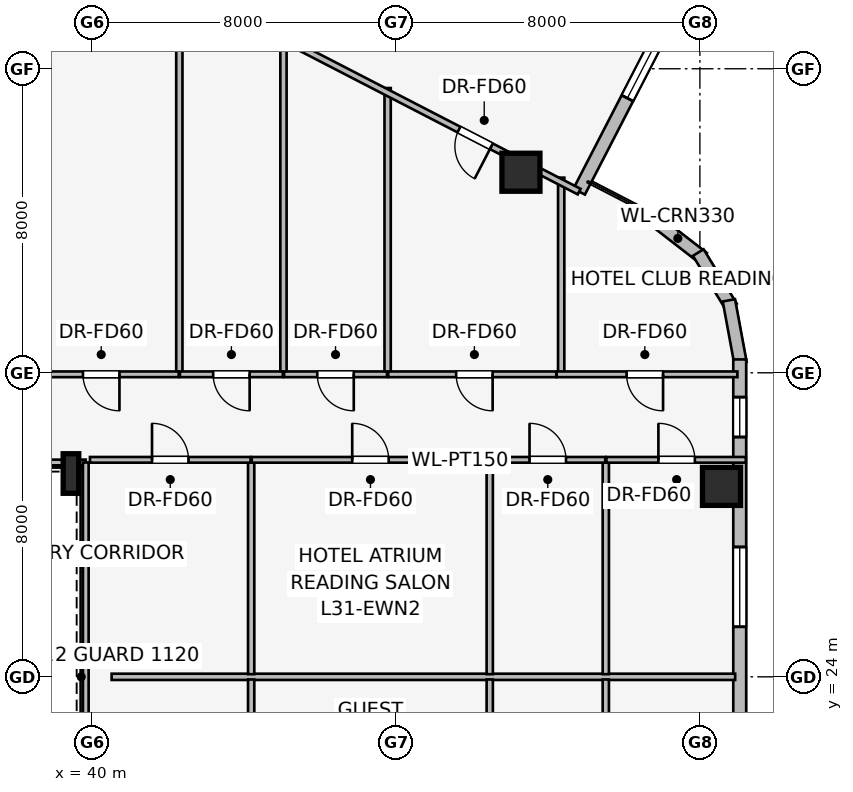
"""IFC4 building model, lengths in metres.
Left out: names, types, materials, properties, quantities, classifications, styles, units other than length and angle.
Written with IfcOpenShell. Run it as: python <this file> out.ifc"""

import sys

from ifc_helpers import new_model, si_unit, direction, frame, frame_2d, origin, origin_2d, place, context, subcontext, project, spatial, rectangle, i_section, extrude, element, fill, save


model = new_model("IFC4")
c1 = context("Model", 3, precision=1e-05, world=origin(), true_north=direction((0.0, 1.0)))
c2 = subcontext(c1, "Body", "Model", "MODEL_VIEW")
j1 = project(units=[si_unit("LENGTHUNIT", "METRE"), si_unit("PLANEANGLEUNIT", "RADIAN")], contexts=[c1])
p1 = place(None, origin())
s1 = spatial("IfcSite", under=j1, at=p1, CompositionType="ELEMENT")
p2 = place(p1, origin())
s2 = spatial("IfcBuilding", under=s1, at=p2, CompositionType="ELEMENT")
p3 = place(p2, frame((0.0, 0.0, 118.8)))
s3 = spatial("IfcBuildingStorey", under=s2, at=p3, CompositionType="ELEMENT", Elevation=118.8)
for number, where, z_axis, x_axis in (
    (1, (51.291, 37.277, 0.0), (0.0, 0.0, 1.0), (1.0, 0.0, 0.0)),
    (2, (56.568, 29.011, 0.0), (0.0, 0.0, 1.0), (1.0, 0.0, 0.0)),
):
    element("IfcColumn", number, at=place(p3, frame(where, z_axis=z_axis, x_axis=x_axis)), inside=s3, PredefinedType="COLUMN", context=c2, shape_type="SweptSolid", body=[
        extrude(rectangle(XDim=1.0, YDim=1.0, at=origin_2d()), origin(), (0.0, 0.0, 1.0), 3.45),
    ])
p4 = place(p3, frame((39.45, 29.35, 0.0), z_axis=(0.0, 0.0, 1.0), x_axis=(1.0, 0.0, 0.0)))
e3 = element("IfcColumn", 3, at=p4, inside=s3, PredefinedType="COLUMN", context=c2, shape_type="SweptSolid", body=[
    extrude(i_section(OverallWidth=0.41, OverallDepth=1.041, WebThickness=0.031, FlangeThickness=0.056, at=origin_2d()), origin(), (0.0, 0.0, 1.0), 3.45),
])
p5 = place(p3, frame((54.757, 36.05, 0.0), z_axis=(0.0, 0.0, 1.0), x_axis=(0.790621329885, -0.612305408053, 0.0)))
e4 = element("IfcWall", 4, at=p5, inside=s3, PredefinedType="STANDARD", context=c2, shape_type="SweptSolid", body=[
    extrude(rectangle(XDim=1.676, YDim=0.33, at=frame_2d((0.838, 0.0))), origin(), (0.0, 0.0, 1.0), 3.19),
])
p6 = place(p3, frame((55.957, 35.164, 0.0), z_axis=(0.0, 0.0, 1.0), x_axis=(0.520519429557, -0.853849824883, 0.0)))
e5 = element("IfcWall", 5, at=p6, inside=s3, PredefinedType="STANDARD", context=c2, shape_type="SweptSolid", body=[
    extrude(rectangle(XDim=1.677, YDim=0.33, at=frame_2d((0.839, 0.0))), origin(), (0.0, 0.0, 1.0), 3.19),
])
p7 = place(p3, frame((56.763, 33.907, 0.0), z_axis=(0.0, 0.0, 1.0), x_axis=(0.181984991895, -0.983301308209, 0.0)))
e6 = element("IfcWall", 6, at=p7, inside=s3, PredefinedType="STANDARD", context=c2, shape_type="SweptSolid", body=[
    extrude(rectangle(XDim=1.677, YDim=0.33, at=frame_2d((0.838, 0.0))), origin(), (0.0, 0.0, 1.0), 3.19),
])
p8 = place(p3, frame((61.63, 53.828, 0.0), z_axis=(0.0, 0.0, 1.0), x_axis=(-0.458697010696, -0.888592737073, 0.0)))
e7 = element("IfcWall", 7, at=p8, inside=s3, PredefinedType="STANDARD", context=c2, shape_type="SweptSolid", body=[
    extrude(rectangle(XDim=19.2, YDim=0.34, at=frame_2d((9.6, 0.0))), origin(), (0.0, 0.0, 1.0), 3.19),
])
p9 = place(p8, frame((2.767, 0.0, 0.75)))
e8 = element("IfcOpeningElement", 8, at=p9, cuts=e7, PredefinedType="OPENING", context=c2, shape_type="SweptSolid", body=[
    extrude(rectangle(XDim=1.6, YDim=1.55, at=frame_2d((0.8, 0.775))), frame((0.0, 0.18, 0.0), z_axis=(0.0, -1.0, 0.0), x_axis=(1.0, 0.0, 0.0)), (0.0, 0.0, 1.0), 0.36),
])
p10 = place(p8, frame((8.8, 0.0, 0.75)))
e9 = element("IfcOpeningElement", 9, at=p10, cuts=e7, PredefinedType="OPENING", context=c2, shape_type="SweptSolid", body=[
    extrude(rectangle(XDim=1.6, YDim=1.55, at=frame_2d((0.8, 0.775))), frame((0.0, 0.18, 0.0), z_axis=(0.0, -1.0, 0.0), x_axis=(1.0, 0.0, 0.0)), (0.0, 0.0, 1.0), 0.36),
])
p11 = place(p8, frame((14.833, 0.0, 0.75)))
e10 = element("IfcOpeningElement", 10, at=p11, cuts=e7, PredefinedType="OPENING", context=c2, shape_type="SweptSolid", body=[
    extrude(rectangle(XDim=1.6, YDim=1.55, at=frame_2d((0.8, 0.775))), frame((0.0, 0.18, 0.0), z_axis=(0.0, -1.0, 0.0), x_axis=(1.0, 0.0, 0.0)), (0.0, 0.0, 1.0), 0.36),
])
p12 = place(p3, frame((57.048, 32.352, 0.0), z_axis=(0.0, 0.0, 1.0), x_axis=(0.0, -1.0, 0.0)))
e11 = element("IfcWall", 11, at=p12, inside=s3, PredefinedType="STANDARD", context=c2, shape_type="SweptSolid", body=[
    extrude(rectangle(XDim=16.704, YDim=0.34, at=frame_2d((8.352, 0.0))), origin(), (0.0, 0.0, 1.0), 3.19),
])
p13 = place(p12, frame((0.992, 0.0, 0.75)))
e12 = element("IfcOpeningElement", 12, at=p13, cuts=e11, PredefinedType="OPENING", context=c2, shape_type="SweptSolid", body=[
    extrude(rectangle(XDim=1.05, YDim=1.4, at=frame_2d((0.525, 0.7))), frame((0.0, 0.18, 0.0), z_axis=(0.0, -1.0, 0.0), x_axis=(1.0, 0.0, 0.0)), (0.0, 0.0, 1.0), 0.36),
])
p14 = place(p12, frame((4.935, 0.0, 0.75)))
e13 = element("IfcOpeningElement", 13, at=p14, cuts=e11, PredefinedType="OPENING", context=c2, shape_type="SweptSolid", body=[
    extrude(rectangle(XDim=2.1, YDim=1.5, at=frame_2d((1.05, 0.75))), frame((0.0, 0.18, 0.0), z_axis=(0.0, -1.0, 0.0), x_axis=(1.0, 0.0, 0.0)), (0.0, 0.0, 1.0), 0.36),
])
p15 = place(p12, frame((9.919, 0.0, 0.75)))
e14 = element("IfcOpeningElement", 14, at=p15, cuts=e11, PredefinedType="OPENING", context=c2, shape_type="SweptSolid", body=[
    extrude(rectangle(XDim=1.6, YDim=1.55, at=frame_2d((0.8, 0.775))), frame((0.0, 0.18, 0.0), z_axis=(0.0, -1.0, 0.0), x_axis=(1.0, 0.0, 0.0)), (0.0, 0.0, 1.0), 0.36),
])
p16 = place(p12, frame((14.702, 0.0, 0.75)))
e15 = element("IfcOpeningElement", 15, at=p16, cuts=e11, PredefinedType="OPENING", context=c2, shape_type="SweptSolid", body=[
    extrude(rectangle(XDim=1.05, YDim=1.4, at=frame_2d((0.525, 0.7))), frame((0.0, 0.18, 0.0), z_axis=(0.0, -1.0, 0.0), x_axis=(1.0, 0.0, 0.0)), (0.0, 0.0, 1.0), 0.36),
])
p17 = place(p3, frame((39.84, 29.64, 0.0), z_axis=(0.0, 0.0, 1.0), x_axis=(-1.0, 0.0, 0.0)))
e16 = element("IfcWall", 16, at=p17, inside=s3, PredefinedType="PARTITIONING", context=c2, shape_type="SweptSolid", body=[
    extrude(rectangle(XDim=12.2, YDim=0.15, at=frame_2d((6.1, 0.0))), origin(), (0.0, 0.0, 1.0), 2.331),
])
p18 = place(p3, frame((39.84, 18.36, 0.0), z_axis=(0.0, 0.0, 1.0), x_axis=(0.0, 1.0, 0.0)))
e17 = element("IfcWall", 17, at=p18, inside=s3, PredefinedType="PARTITIONING", context=c2, shape_type="SweptSolid", body=[
    extrude(rectangle(XDim=11.28, YDim=0.15, at=frame_2d((5.64, 0.0))), origin(), (0.0, 0.0, 1.0), 3.19),
])
p19 = place(p3, frame((42.302, 31.97, 0.0), z_axis=(0.0, 0.0, 1.0), x_axis=(0.0, 1.0, 0.0)))
e18 = element("IfcWall", 18, at=p19, inside=s3, PredefinedType="PARTITIONING", context=c2, shape_type="SweptSolid", body=[
    extrude(rectangle(XDim=10.352, YDim=0.165, at=frame_2d((5.176, 0.0))), origin(), (0.0, 0.0, 1.0), 3.19),
])
p20 = place(p3, frame((45.042, 31.97, 0.0), z_axis=(0.0, 0.0, 1.0), x_axis=(0.0, 1.0, 0.0)))
e19 = element("IfcWall", 19, at=p20, inside=s3, PredefinedType="PARTITIONING", context=c2, shape_type="SweptSolid", body=[
    extrude(rectangle(XDim=8.937, YDim=0.165, at=frame_2d((4.469, 0.0))), origin(), (0.0, 0.0, 1.0), 3.19),
])
p21 = place(p3, frame((47.783, 31.97, 0.0), z_axis=(0.0, 0.0, 1.0), x_axis=(0.0, 1.0, 0.0)))
e20 = element("IfcWall", 20, at=p21, inside=s3, PredefinedType="PARTITIONING", context=c2, shape_type="SweptSolid", body=[
    extrude(rectangle(XDim=7.523, YDim=0.165, at=frame_2d((3.761, 0.0))), origin(), (0.0, 0.0, 1.0), 3.19),
])
p22 = place(p3, frame((52.35, 31.97, 0.0), z_axis=(0.0, 0.0, 1.0), x_axis=(0.0, 1.0, 0.0)))
e21 = element("IfcWall", 21, at=p22, inside=s3, PredefinedType="PARTITIONING", context=c2, shape_type="SweptSolid", body=[
    extrude(rectangle(XDim=5.165, YDim=0.165, at=frame_2d((2.583, 0.0))), origin(), (0.0, 0.0, 1.0), 3.19),
])
p23 = place(p3, frame((42.286, 31.96, 0.0), z_axis=(0.0, 0.0, 1.0), x_axis=(-1.0, 0.0, 0.0)))
e22 = element("IfcWall", 22, at=p23, inside=s3, PredefinedType="PARTITIONING", context=c2, shape_type="SweptSolid", body=[
    extrude(rectangle(XDim=3.965, YDim=0.15, at=frame_2d((1.982, 0.0))), origin(), (0.0, 0.0, 1.0), 3.19),
])
p24 = place(p23, frame((1.56, 0.0, 0.0)))
e23 = element("IfcOpeningElement", 23, at=p24, cuts=e22, PredefinedType="OPENING", context=c2, shape_type="SweptSolid", body=[
    extrude(rectangle(XDim=0.96, YDim=2.0, at=frame_2d((0.48, 1.0))), frame((0.0, 0.085, 0.0), z_axis=(0.0, -1.0, 0.0), x_axis=(1.0, 0.0, 0.0)), (0.0, 0.0, 1.0), 0.17),
])
p25 = place(p3, frame((45.026, 31.96, 0.0), z_axis=(0.0, 0.0, 1.0), x_axis=(-1.0, 0.0, 0.0)))
e24 = element("IfcWall", 24, at=p25, inside=s3, PredefinedType="PARTITIONING", context=c2, shape_type="SweptSolid", body=[
    extrude(rectangle(XDim=2.708, YDim=0.15, at=frame_2d((1.354, 0.0))), origin(), (0.0, 0.0, 1.0), 3.19),
])
p26 = place(p25, frame((0.874, 0.0, 0.0)))
e25 = element("IfcOpeningElement", 25, at=p26, cuts=e24, PredefinedType="OPENING", context=c2, shape_type="SweptSolid", body=[
    extrude(rectangle(XDim=0.96, YDim=2.0, at=frame_2d((0.48, 1.0))), frame((0.0, 0.085, 0.0), z_axis=(0.0, -1.0, 0.0), x_axis=(1.0, 0.0, 0.0)), (0.0, 0.0, 1.0), 0.17),
])
p27 = place(p3, frame((47.767, 31.96, 0.0), z_axis=(0.0, 0.0, 1.0), x_axis=(-1.0, 0.0, 0.0)))
e26 = element("IfcWall", 26, at=p27, inside=s3, PredefinedType="PARTITIONING", context=c2, shape_type="SweptSolid", body=[
    extrude(rectangle(XDim=2.709, YDim=0.15, at=frame_2d((1.354, 0.0))), origin(), (0.0, 0.0, 1.0), 3.19),
])
p28 = place(p27, frame((0.875, 0.0, 0.0)))
e27 = element("IfcOpeningElement", 27, at=p28, cuts=e26, PredefinedType="OPENING", context=c2, shape_type="SweptSolid", body=[
    extrude(rectangle(XDim=0.96, YDim=2.0, at=frame_2d((0.48, 1.0))), frame((0.0, 0.085, 0.0), z_axis=(0.0, -1.0, 0.0), x_axis=(1.0, 0.0, 0.0)), (0.0, 0.0, 1.0), 0.17),
])
p29 = place(p3, frame((52.22, 31.96, 0.0), z_axis=(0.0, 0.0, 1.0), x_axis=(-1.0, 0.0, 0.0)))
e28 = element("IfcWall", 28, at=p29, inside=s3, PredefinedType="PARTITIONING", context=c2, shape_type="SweptSolid", body=[
    extrude(rectangle(XDim=4.421, YDim=0.15, at=frame_2d((2.21, 0.0))), origin(), (0.0, 0.0, 1.0), 3.19),
])
p30 = place(p29, frame((1.674, 0.0, 0.0)))
e29 = element("IfcOpeningElement", 29, at=p30, cuts=e28, PredefinedType="OPENING", context=c2, shape_type="SweptSolid", body=[
    extrude(rectangle(XDim=0.96, YDim=2.0, at=frame_2d((0.48, 1.0))), frame((0.0, 0.085, 0.0), z_axis=(0.0, -1.0, 0.0), x_axis=(1.0, 0.0, 0.0)), (0.0, 0.0, 1.0), 0.17),
])
p31 = place(p3, frame((56.987, 31.96, 0.0), z_axis=(0.0, 0.0, 1.0), x_axis=(-1.0, 0.0, 0.0)))
e30 = element("IfcWall", 30, at=p31, inside=s3, PredefinedType="PARTITIONING", context=c2, shape_type="SweptSolid", body=[
    extrude(rectangle(XDim=4.757, YDim=0.15, at=frame_2d((2.378, 0.0))), origin(), (0.0, 0.0, 1.0), 3.19),
])
p32 = place(p31, frame((1.956, 0.0, 0.0)))
e31 = element("IfcOpeningElement", 31, at=p32, cuts=e30, PredefinedType="OPENING", context=c2, shape_type="SweptSolid", body=[
    extrude(rectangle(XDim=0.96, YDim=2.0, at=frame_2d((0.48, 1.0))), frame((0.0, 0.085, 0.0), z_axis=(0.0, -1.0, 0.0), x_axis=(1.0, 0.0, 0.0)), (0.0, 0.0, 1.0), 0.17),
])
p33 = place(p3, frame((40.52, 24.0, 0.0), z_axis=(0.0, 0.0, 1.0), x_axis=(1.0, 0.0, 0.0)))
e32 = element("IfcWall", 32, at=p33, inside=s3, PredefinedType="PARTITIONING", context=c2, shape_type="SweptSolid", body=[
    extrude(rectangle(XDim=16.408, YDim=0.165, at=frame_2d((8.204, 0.0))), origin(), (0.0, 0.0, 1.0), 3.19),
])
p34 = place(p3, frame((44.192, 24.07, 0.0), z_axis=(0.0, 0.0, 1.0), x_axis=(0.0, 1.0, 0.0)))
e33 = element("IfcWall", 33, at=p34, inside=s3, PredefinedType="PARTITIONING", context=c2, shape_type="SweptSolid", body=[
    extrude(rectangle(XDim=5.64, YDim=0.165, at=frame_2d((2.82, 0.0))), origin(), (0.0, 0.0, 1.0), 2.733),
])
for number, where, z_axis, x_axis in (
    (34, (50.47, 24.07, 0.0), (0.0, 0.0, 1.0), (0.0, 1.0, 0.0)),
    (35, (53.524, 24.07, 0.0), (0.0, 0.0, 1.0), (0.0, 1.0, 0.0)),
):
    element("IfcWall", number, at=place(p3, frame(where, z_axis=z_axis, x_axis=x_axis)), inside=s3, PredefinedType="PARTITIONING", context=c2, shape_type="SweptSolid", body=[
        extrude(rectangle(XDim=5.64, YDim=0.165, at=frame_2d((2.82, 0.0))), origin(), (0.0, 0.0, 1.0), 3.19),
    ])
p35 = place(p3, frame((39.95, 29.71, 0.0), z_axis=(0.0, 0.0, 1.0), x_axis=(1.0, 0.0, 0.0)))
e36 = element("IfcWall", 36, at=p35, inside=s3, PredefinedType="PARTITIONING", context=c2, shape_type="SweptSolid", body=[
    extrude(rectangle(XDim=4.227, YDim=0.15, at=frame_2d((2.114, 0.0))), origin(), (0.0, 0.0, 1.0), 3.19),
])
p36 = place(p35, frame((1.633, 0.0, 0.0)))
e37 = element("IfcOpeningElement", 37, at=p36, cuts=e36, PredefinedType="OPENING", context=c2, shape_type="SweptSolid", body=[
    extrude(rectangle(XDim=0.96, YDim=2.0, at=frame_2d((0.48, 1.0))), frame((0.0, 0.085, 0.0), z_axis=(0.0, -1.0, 0.0), x_axis=(1.0, 0.0, 0.0)), (0.0, 0.0, 1.0), 0.17),
])
p37 = place(p3, frame((44.207, 29.71, 0.0), z_axis=(0.0, 0.0, 1.0), x_axis=(1.0, 0.0, 0.0)))
e38 = element("IfcWall", 38, at=p37, inside=s3, PredefinedType="PARTITIONING", context=c2, shape_type="SweptSolid", body=[
    extrude(rectangle(XDim=6.248, YDim=0.15, at=frame_2d((3.124, 0.0))), origin(), (0.0, 0.0, 1.0), 3.19),
])
p38 = place(p37, frame((2.644, 0.0, 0.0)))
e39 = element("IfcOpeningElement", 39, at=p38, cuts=e38, PredefinedType="OPENING", context=c2, shape_type="SweptSolid", body=[
    extrude(rectangle(XDim=0.96, YDim=2.0, at=frame_2d((0.48, 1.0))), frame((0.0, 0.085, 0.0), z_axis=(0.0, -1.0, 0.0), x_axis=(1.0, 0.0, 0.0)), (0.0, 0.0, 1.0), 0.17),
])
p39 = place(p3, frame((50.485, 29.71, 0.0), z_axis=(0.0, 0.0, 1.0), x_axis=(1.0, 0.0, 0.0)))
e40 = element("IfcWall", 40, at=p39, inside=s3, PredefinedType="PARTITIONING", context=c2, shape_type="SweptSolid", body=[
    extrude(rectangle(XDim=3.024, YDim=0.15, at=frame_2d((1.512, 0.0))), origin(), (0.0, 0.0, 1.0), 3.19),
])
p40 = place(p39, frame((1.032, 0.0, 0.0)))
e41 = element("IfcOpeningElement", 41, at=p40, cuts=e40, PredefinedType="OPENING", context=c2, shape_type="SweptSolid", body=[
    extrude(rectangle(XDim=0.96, YDim=2.0, at=frame_2d((0.48, 1.0))), frame((0.0, 0.085, 0.0), z_axis=(0.0, -1.0, 0.0), x_axis=(1.0, 0.0, 0.0)), (0.0, 0.0, 1.0), 0.17),
])
p41 = place(p3, frame((53.539, 29.71, 0.0), z_axis=(0.0, 0.0, 1.0), x_axis=(1.0, 0.0, 0.0)))
e42 = element("IfcWall", 42, at=p41, inside=s3, PredefinedType="PARTITIONING", context=c2, shape_type="SweptSolid", body=[
    extrude(rectangle(XDim=3.669, YDim=0.15, at=frame_2d((1.834, 0.0))), origin(), (0.0, 0.0, 1.0), 3.19),
])
p42 = place(p41, frame((1.369, 0.0, 0.0)))
e43 = element("IfcOpeningElement", 43, at=p42, cuts=e42, PredefinedType="OPENING", context=c2, shape_type="SweptSolid", body=[
    extrude(rectangle(XDim=0.96, YDim=2.0, at=frame_2d((0.48, 1.0))), frame((0.0, 0.085, 0.0), z_axis=(0.0, -1.0, 0.0), x_axis=(1.0, 0.0, 0.0)), (0.0, 0.0, 1.0), 0.17),
])
p43 = place(p3, frame((44.192, 18.29, 0.0), z_axis=(0.0, 0.0, 1.0), x_axis=(0.0, 1.0, 0.0)))
e44 = element("IfcWall", 44, at=p43, inside=s3, PredefinedType="PARTITIONING", context=c2, shape_type="SweptSolid", body=[
    extrude(rectangle(XDim=5.64, YDim=0.165, at=frame_2d((2.82, 0.0))), origin(), (0.0, 0.0, 1.0), 2.733),
])
for number, where, z_axis, x_axis in (
    (45, (50.47, 18.29, 0.0), (0.0, 0.0, 1.0), (0.0, 1.0, 0.0)),
    (46, (53.524, 18.29, 0.0), (0.0, 0.0, 1.0), (0.0, 1.0, 0.0)),
):
    element("IfcWall", number, at=place(p3, frame(where, z_axis=z_axis, x_axis=x_axis)), inside=s3, PredefinedType="PARTITIONING", context=c2, shape_type="SweptSolid", body=[
        extrude(rectangle(XDim=5.64, YDim=0.165, at=frame_2d((2.82, 0.0))), origin(), (0.0, 0.0, 1.0), 3.19),
    ])
p44 = place(p3, frame((52.823, 36.767, 0.0), z_axis=(0.0, 0.0, 1.0), x_axis=(-0.888588109751, 0.458705974683, 0.0)))
e47 = element("IfcWall", 47, at=p44, inside=s3, PredefinedType="PARTITIONING", context=c2, shape_type="SweptSolid", body=[
    extrude(rectangle(XDim=14.399, YDim=0.165, at=frame_2d((7.2, 0.0))), origin(), (0.0, 0.0, 1.0), 2.562),
])
p45 = place(p44, frame((2.6, 0.0, 0.0)))
e48 = element("IfcOpeningElement", 48, at=p45, cuts=e47, PredefinedType="OPENING", context=c2, shape_type="SweptSolid", body=[
    extrude(rectangle(XDim=0.96, YDim=2.0, at=frame_2d((0.48, 1.0))), frame((0.0, 0.093, 0.0), z_axis=(0.0, -1.0, 0.0), x_axis=(1.0, 0.0, 0.0)), (0.0, 0.0, 1.0), 0.185),
])
p46 = place(p11, origin())
e49 = element("IfcWindow", 49, at=p46, inside=s3, PartitioningType="SINGLE_PANEL", PredefinedType="WINDOW", context=c2, shape_type="SweptSolid", body=[
    extrude(rectangle(XDim=1.6, YDim=1.55, at=frame_2d((0.8, 0.775))), frame((0.0, 0.03, 0.0), z_axis=(0.0, -1.0, 0.0), x_axis=(1.0, 0.0, 0.0)), (0.0, 0.0, 1.0), 0.06),
])
fill(e10, e49)
p47 = place(p13, origin())
e50 = element("IfcWindow", 50, at=p47, inside=s3, PartitioningType="SINGLE_PANEL", PredefinedType="WINDOW", context=c2, shape_type="SweptSolid", body=[
    extrude(rectangle(XDim=1.05, YDim=1.4, at=frame_2d((0.525, 0.7))), frame((0.0, 0.03, 0.0), z_axis=(0.0, -1.0, 0.0), x_axis=(1.0, 0.0, 0.0)), (0.0, 0.0, 1.0), 0.06),
])
fill(e12, e50)
p48 = place(p14, origin())
e51 = element("IfcWindow", 51, at=p48, inside=s3, PartitioningType="SINGLE_PANEL", PredefinedType="WINDOW", context=c2, shape_type="SweptSolid", body=[
    extrude(rectangle(XDim=2.1, YDim=1.5, at=frame_2d((1.05, 0.75))), frame((0.0, 0.03, 0.0), z_axis=(0.0, -1.0, 0.0), x_axis=(1.0, 0.0, 0.0)), (0.0, 0.0, 1.0), 0.06),
])
fill(e13, e51)
p49 = place(p24, origin())
e52 = element("IfcDoor", 52, at=p49, inside=s3, OperationType="SINGLE_SWING_LEFT", PredefinedType="DOOR", context=c2, shape_type="SweptSolid", body=[
    extrude(rectangle(XDim=0.96, YDim=2.0, at=frame_2d((0.48, 1.0))), frame((0.0, 0.025, 0.0), z_axis=(0.0, -1.0, 0.0), x_axis=(1.0, 0.0, 0.0)), (0.0, 0.0, 1.0), 0.05),
])
fill(e23, e52)
p50 = place(p26, origin())
e53 = element("IfcDoor", 53, at=p50, inside=s3, OperationType="SINGLE_SWING_LEFT", PredefinedType="DOOR", context=c2, shape_type="SweptSolid", body=[
    extrude(rectangle(XDim=0.96, YDim=2.0, at=frame_2d((0.48, 1.0))), frame((0.0, 0.025, 0.0), z_axis=(0.0, -1.0, 0.0), x_axis=(1.0, 0.0, 0.0)), (0.0, 0.0, 1.0), 0.05),
])
fill(e25, e53)
p51 = place(p28, origin())
e54 = element("IfcDoor", 54, at=p51, inside=s3, OperationType="SINGLE_SWING_LEFT", PredefinedType="DOOR", context=c2, shape_type="SweptSolid", body=[
    extrude(rectangle(XDim=0.96, YDim=2.0, at=frame_2d((0.48, 1.0))), frame((0.0, 0.025, 0.0), z_axis=(0.0, -1.0, 0.0), x_axis=(1.0, 0.0, 0.0)), (0.0, 0.0, 1.0), 0.05),
])
fill(e27, e54)
p52 = place(p30, origin())
e55 = element("IfcDoor", 55, at=p52, inside=s3, OperationType="SINGLE_SWING_LEFT", PredefinedType="DOOR", context=c2, shape_type="SweptSolid", body=[
    extrude(rectangle(XDim=0.96, YDim=2.0, at=frame_2d((0.48, 1.0))), frame((0.0, 0.025, 0.0), z_axis=(0.0, -1.0, 0.0), x_axis=(1.0, 0.0, 0.0)), (0.0, 0.0, 1.0), 0.05),
])
fill(e29, e55)
p53 = place(p32, origin())
e56 = element("IfcDoor", 56, at=p53, inside=s3, OperationType="SINGLE_SWING_LEFT", PredefinedType="DOOR", context=c2, shape_type="SweptSolid", body=[
    extrude(rectangle(XDim=0.96, YDim=2.0, at=frame_2d((0.48, 1.0))), frame((0.0, 0.025, 0.0), z_axis=(0.0, -1.0, 0.0), x_axis=(1.0, 0.0, 0.0)), (0.0, 0.0, 1.0), 0.05),
])
fill(e31, e56)
p54 = place(p36, origin())
e57 = element("IfcDoor", 57, at=p54, inside=s3, OperationType="SINGLE_SWING_LEFT", PredefinedType="DOOR", context=c2, shape_type="SweptSolid", body=[
    extrude(rectangle(XDim=0.96, YDim=2.0, at=frame_2d((0.48, 1.0))), frame((0.0, 0.025, 0.0), z_axis=(0.0, -1.0, 0.0), x_axis=(1.0, 0.0, 0.0)), (0.0, 0.0, 1.0), 0.05),
])
fill(e37, e57)
p55 = place(p38, origin())
e58 = element("IfcDoor", 58, at=p55, inside=s3, OperationType="SINGLE_SWING_LEFT", PredefinedType="DOOR", context=c2, shape_type="SweptSolid", body=[
    extrude(rectangle(XDim=0.96, YDim=2.0, at=frame_2d((0.48, 1.0))), frame((0.0, 0.025, 0.0), z_axis=(0.0, -1.0, 0.0), x_axis=(1.0, 0.0, 0.0)), (0.0, 0.0, 1.0), 0.05),
])
fill(e39, e58)
p56 = place(p40, origin())
e59 = element("IfcDoor", 59, at=p56, inside=s3, OperationType="SINGLE_SWING_LEFT", PredefinedType="DOOR", context=c2, shape_type="SweptSolid", body=[
    extrude(rectangle(XDim=0.96, YDim=2.0, at=frame_2d((0.48, 1.0))), frame((0.0, 0.025, 0.0), z_axis=(0.0, -1.0, 0.0), x_axis=(1.0, 0.0, 0.0)), (0.0, 0.0, 1.0), 0.05),
])
fill(e41, e59)
p57 = place(p42, origin())
e60 = element("IfcDoor", 60, at=p57, inside=s3, OperationType="SINGLE_SWING_LEFT", PredefinedType="DOOR", context=c2, shape_type="SweptSolid", body=[
    extrude(rectangle(XDim=0.96, YDim=2.0, at=frame_2d((0.48, 1.0))), frame((0.0, 0.025, 0.0), z_axis=(0.0, -1.0, 0.0), x_axis=(1.0, 0.0, 0.0)), (0.0, 0.0, 1.0), 0.05),
])
fill(e43, e60)
p58 = place(p45, origin())
e61 = element("IfcDoor", 61, at=p58, inside=s3, OperationType="SINGLE_SWING_LEFT", PredefinedType="DOOR", context=c2, shape_type="SweptSolid", body=[
    extrude(rectangle(XDim=0.96, YDim=2.0, at=frame_2d((0.48, 1.0))), frame((0.0, 0.025, 0.0), z_axis=(0.0, -1.0, 0.0), x_axis=(1.0, 0.0, 0.0)), (0.0, 0.0, 1.0), 0.05),
])
fill(e48, e61)
save(model, sys.argv[1])
